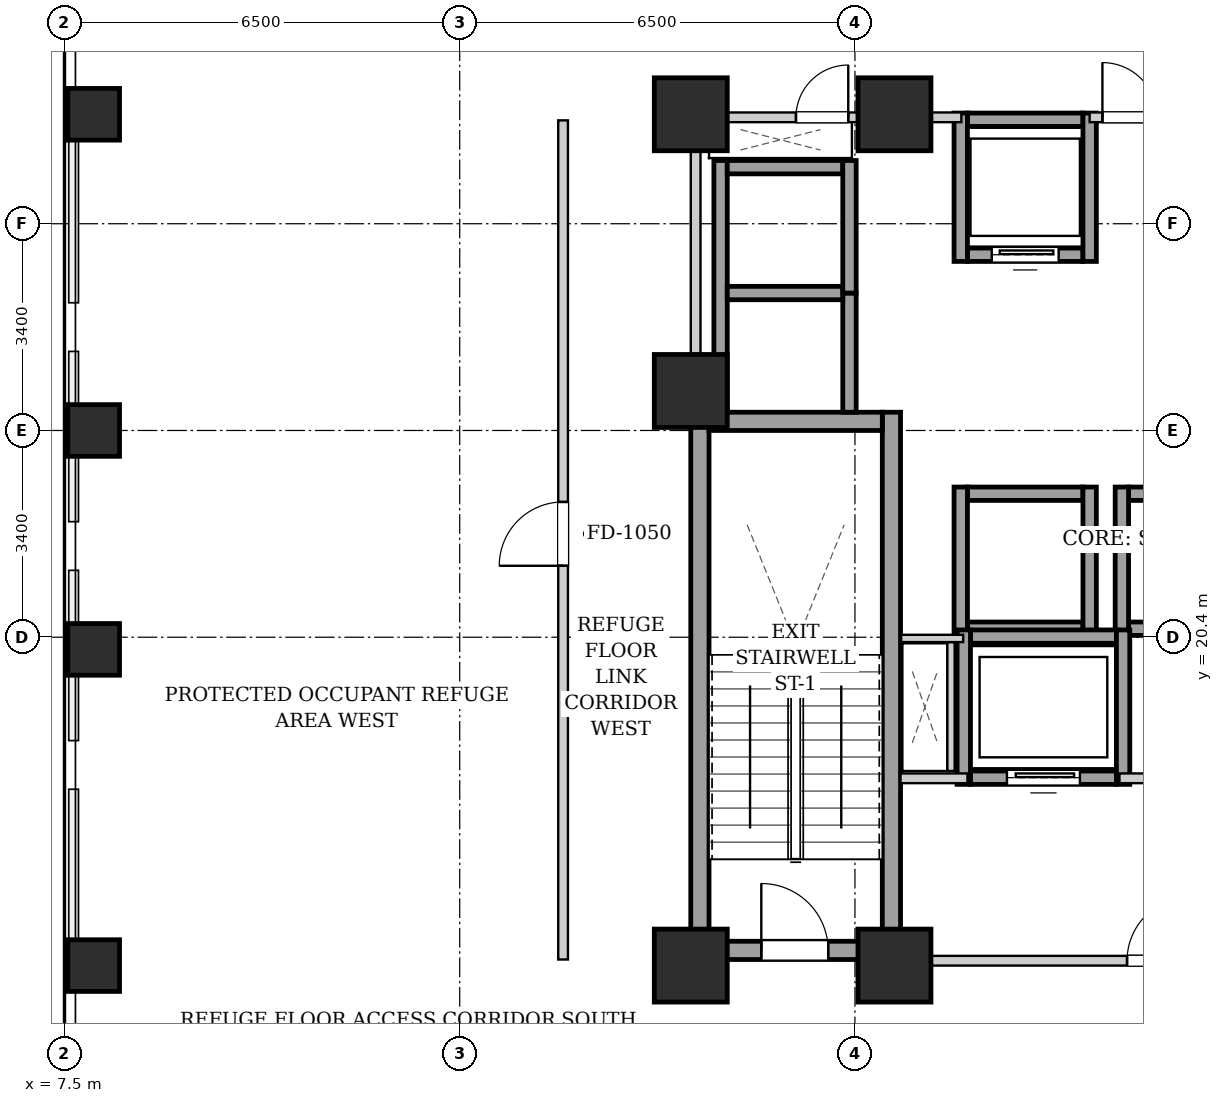
"""IFC4 building model, lengths in metres.
Left out: names, types, materials, properties, quantities, classifications, styles, units other than length and angle.
Written with IfcOpenShell. Run it as: python <this file> out.ifc"""

import sys

from ifc_helpers import new_model, si_unit, direction, frame, frame_2d, origin, origin_2d, place, context, subcontext, project, spatial, rectangle, extrude, element, fill, save


model = new_model("IFC4")
c1 = context("Model", 3, precision=1e-05, world=origin(), true_north=direction((0.0, 1.0)))
c2 = subcontext(c1, "Body", "Model", "MODEL_VIEW")
j1 = project(units=[si_unit("LENGTHUNIT", "METRE"), si_unit("PLANEANGLEUNIT", "RADIAN")], contexts=[c1])
p1 = place(None, origin())
s1 = spatial("IfcSite", under=j1, at=p1, CompositionType="ELEMENT")
p2 = place(p1, origin())
s2 = spatial("IfcBuilding", under=s1, at=p2, CompositionType="ELEMENT")
p3 = place(p2, frame((0.0, 0.0, 70.6)))
s3 = spatial("IfcBuildingStorey", under=s2, at=p3, CompositionType="ELEMENT", Elevation=70.6)
for number, where, z_axis, x_axis in (
    (1, (7.98, 15.0, 0.0), (0.0, 0.0, 1.0), (1.0, 0.0, 0.0)),
    (2, (7.98, 20.2, 0.0), (0.0, 0.0, 1.0), (1.0, 0.0, 0.0)),
    (3, (7.98, 23.8, 0.0), (0.0, 0.0, 1.0), (1.0, 0.0, 0.0)),
    (4, (7.98, 29.0, 0.0), (0.0, 0.0, 1.0), (1.0, 0.0, 0.0)),
):
    element("IfcColumn", number, at=place(p3, frame(where, z_axis=z_axis, x_axis=x_axis)), inside=s3, PredefinedType="COLUMN", context=c2, shape_type="SweptSolid", body=[
        extrude(rectangle(XDim=0.85, YDim=0.85, at=origin_2d()), origin(), (0.0, 0.0, 1.0), 4.5),
    ])
for number, where, z_axis, x_axis in (
    (5, (17.8, 15.0, 0.0), (0.0, 0.0, 1.0), (1.0, 0.0, 0.0)),
    (6, (21.15, 15.0, 0.0), (0.0, 0.0, 1.0), (1.0, 0.0, 0.0)),
    (7, (17.8, 29.0, 0.0), (0.0, 0.0, 1.0), (1.0, 0.0, 0.0)),
    (8, (21.15, 29.0, 0.0), (0.0, 0.0, 1.0), (1.0, 0.0, 0.0)),
    (9, (17.8, 24.45, 0.0), (0.0, 0.0, 1.0), (1.0, 0.0, 0.0)),
):
    element("IfcColumn", number, at=place(p3, frame(where, z_axis=z_axis, x_axis=x_axis)), inside=s3, PredefinedType="COLUMN", context=c2, shape_type="SweptSolid", body=[
        extrude(rectangle(XDim=1.2, YDim=1.2, at=origin_2d()), origin(), (0.0, 0.0, 1.0), 4.5),
    ])
for number, where, z_axis, x_axis in (
    (10, (17.95, 15.1, 0.0), (0.0, 0.0, 1.0), (0.0, 1.0, 0.0)),
    (11, (21.1, 15.1, 0.0), (0.0, 0.0, 1.0), (0.0, 1.0, 0.0)),
):
    element("IfcWall", number, at=place(p3, frame(where, z_axis=z_axis, x_axis=x_axis)), inside=s3, PredefinedType="SHEAR", context=c2, shape_type="SweptSolid", body=[
        extrude(rectangle(XDim=9.0, YDim=0.3, at=frame_2d((4.5, 0.0))), origin(), (0.0, 0.0, 1.0), 4.24),
    ])
p4 = place(p3, frame((18.1, 23.95, 0.0), z_axis=(0.0, 0.0, 1.0), x_axis=(1.0, 0.0, 0.0)))
e12 = element("IfcWall", 12, at=p4, inside=s3, PredefinedType="SHEAR", context=c2, shape_type="SweptSolid", body=[
    extrude(rectangle(XDim=2.85, YDim=0.3, at=frame_2d((1.425, 0.0))), origin(), (0.0, 0.0, 1.0), 4.24),
])
p5 = place(p3, frame((18.1, 15.25, 0.0), z_axis=(0.0, 0.0, 1.0), x_axis=(1.0, 0.0, 0.0)))
e13 = element("IfcWall", 13, at=p5, inside=s3, PredefinedType="SHEAR", context=c2, shape_type="SweptSolid", body=[
    extrude(rectangle(XDim=2.85, YDim=0.3, at=frame_2d((1.425, 0.0))), origin(), (0.0, 0.0, 1.0), 4.24),
])
p6 = place(p5, frame((0.86, 0.0, 0.0)))
e14 = element("IfcOpeningElement", 14, at=p6, cuts=e13, PredefinedType="OPENING", context=c2, shape_type="SweptSolid", body=[
    extrude(rectangle(XDim=1.1, YDim=2.05, at=frame_2d((0.55, 1.025))), frame((0.0, 0.16, 0.0), z_axis=(0.0, -1.0, 0.0), x_axis=(1.0, 0.0, 0.0)), (0.0, 0.0, 1.0), 0.32),
])
p7 = place(p3, frame((22.35, 26.69, 0.0), z_axis=(0.0, 0.0, 1.0), x_axis=(1.0, 0.0, 0.0)))
e15 = element("IfcWall", 15, at=p7, inside=s3, PredefinedType="SHEAR", context=c2, shape_type="SweptSolid", body=[
    extrude(rectangle(XDim=1.9, YDim=0.22, at=frame_2d((0.95, 0.0))), origin(), (0.0, 0.0, 1.0), 4.24),
])
p8 = place(p7, frame((0.4, 0.0, 0.0)))
e16 = element("IfcOpeningElement", 16, at=p8, cuts=e15, PredefinedType="OPENING", context=c2, shape_type="SweptSolid", body=[
    extrude(rectangle(XDim=1.1, YDim=2.15, at=frame_2d((0.55, 1.075))), frame((0.0, 0.12, 0.0), z_axis=(0.0, -1.0, 0.0), x_axis=(1.0, 0.0, 0.0)), (0.0, 0.0, 1.0), 0.24),
])
p9 = place(p3, frame((22.35, 28.91, 0.0), z_axis=(0.0, 0.0, 1.0), x_axis=(1.0, 0.0, 0.0)))
e17 = element("IfcWall", 17, at=p9, inside=s3, PredefinedType="SHEAR", context=c2, shape_type="SweptSolid", body=[
    extrude(rectangle(XDim=1.9, YDim=0.22, at=frame_2d((0.95, 0.0))), origin(), (0.0, 0.0, 1.0), 4.24),
])
for number, where, z_axis, x_axis in (
    (18, (22.24, 26.58, 0.0), (0.0, 0.0, 1.0), (0.0, 1.0, 0.0)),
    (19, (24.36, 26.58, 0.0), (0.0, 0.0, 1.0), (0.0, 1.0, 0.0)),
):
    element("IfcWall", number, at=place(p3, frame(where, z_axis=z_axis, x_axis=x_axis)), inside=s3, PredefinedType="SHEAR", context=c2, shape_type="SweptSolid", body=[
        extrude(rectangle(XDim=2.44, YDim=0.22, at=frame_2d((1.22, 0.0))), origin(), (0.0, 0.0, 1.0), 4.24),
    ])
for number, where, z_axis, x_axis in (
    (20, (22.35, 20.54, 0.0), (0.0, 0.0, 1.0), (1.0, 0.0, 0.0)),
    (21, (22.35, 22.76, 0.0), (0.0, 0.0, 1.0), (1.0, 0.0, 0.0)),
):
    element("IfcWall", number, at=place(p3, frame(where, z_axis=z_axis, x_axis=x_axis)), inside=s3, PredefinedType="SHEAR", context=c2, shape_type="SweptSolid", body=[
        extrude(rectangle(XDim=1.9, YDim=0.22, at=frame_2d((0.95, 0.0))), origin(), (0.0, 0.0, 1.0), 4.24),
    ])
for number, where, z_axis, x_axis in (
    (22, (22.24, 20.43, 0.0), (0.0, 0.0, 1.0), (0.0, 1.0, 0.0)),
    (23, (24.36, 20.43, 0.0), (0.0, 0.0, 1.0), (0.0, 1.0, 0.0)),
):
    element("IfcWall", number, at=place(p3, frame(where, z_axis=z_axis, x_axis=x_axis)), inside=s3, PredefinedType="SHEAR", context=c2, shape_type="SweptSolid", body=[
        extrude(rectangle(XDim=2.44, YDim=0.22, at=frame_2d((1.22, 0.0))), origin(), (0.0, 0.0, 1.0), 4.24),
    ])
for number, where, z_axis, x_axis in (
    (24, (25.0, 20.54, 0.0), (0.0, 0.0, 1.0), (1.0, 0.0, 0.0)),
    (25, (25.0, 22.76, 0.0), (0.0, 0.0, 1.0), (1.0, 0.0, 0.0)),
):
    element("IfcWall", number, at=place(p3, frame(where, z_axis=z_axis, x_axis=x_axis)), inside=s3, PredefinedType="SHEAR", context=c2, shape_type="SweptSolid", body=[
        extrude(rectangle(XDim=1.9, YDim=0.22, at=frame_2d((0.95, 0.0))), origin(), (0.0, 0.0, 1.0), 4.24),
    ])
p10 = place(p3, frame((24.89, 20.43, 0.0), z_axis=(0.0, 0.0, 1.0), x_axis=(0.0, 1.0, 0.0)))
e26 = element("IfcWall", 26, at=p10, inside=s3, PredefinedType="SHEAR", context=c2, shape_type="SweptSolid", body=[
    extrude(rectangle(XDim=2.44, YDim=0.22, at=frame_2d((1.22, 0.0))), origin(), (0.0, 0.0, 1.0), 4.24),
])
p11 = place(p3, frame((18.29, 24.1, 0.0), z_axis=(0.0, 0.0, 1.0), x_axis=(0.0, 1.0, 0.0)))
e27 = element("IfcWall", 27, at=p11, inside=s3, PredefinedType="SHEAR", context=c2, shape_type="SweptSolid", body=[
    extrude(rectangle(XDim=4.14, YDim=0.22, at=frame_2d((2.07, 0.0))), origin(), (0.0, 0.0, 1.0), 4.24),
])
p12 = place(p3, frame((20.41, 24.1, 0.0), z_axis=(0.0, 0.0, 1.0), x_axis=(0.0, 1.0, 0.0)))
e28 = element("IfcWall", 28, at=p12, inside=s3, PredefinedType="SHEAR", context=c2, shape_type="SweptSolid", body=[
    extrude(rectangle(XDim=1.96, YDim=0.22, at=frame_2d((0.98, 0.0))), origin(), (0.0, 0.0, 1.0), 4.24),
])
for number, where, z_axis, x_axis in (
    (29, (18.4, 26.06, 0.0), (0.0, 0.0, 1.0), (1.0, 0.0, 0.0)),
    (30, (18.4, 28.13, 0.0), (0.0, 0.0, 1.0), (1.0, 0.0, 0.0)),
):
    element("IfcWall", number, at=place(p3, frame(where, z_axis=z_axis, x_axis=x_axis)), inside=s3, PredefinedType="SHEAR", context=c2, shape_type="SweptSolid", body=[
        extrude(rectangle(XDim=1.9, YDim=0.22, at=frame_2d((0.95, 0.0))), origin(), (0.0, 0.0, 1.0), 4.24),
    ])
p13 = place(p3, frame((20.41, 26.06, 0.0), z_axis=(0.0, 0.0, 1.0), x_axis=(0.0, 1.0, 0.0)))
e31 = element("IfcWall", 31, at=p13, inside=s3, PredefinedType="SHEAR", context=c2, shape_type="SweptSolid", body=[
    extrude(rectangle(XDim=2.18, YDim=0.22, at=frame_2d((1.09, 0.0))), origin(), (0.0, 0.0, 1.0), 4.24),
])
p14 = place(p3, frame((22.4, 18.09, 0.0), z_axis=(0.0, 0.0, 1.0), x_axis=(1.0, 0.0, 0.0)))
e32 = element("IfcWall", 32, at=p14, inside=s3, PredefinedType="SHEAR", context=c2, shape_type="SweptSolid", body=[
    extrude(rectangle(XDim=2.4, YDim=0.22, at=frame_2d((1.2, 0.0))), origin(), (0.0, 0.0, 1.0), 4.24),
])
p15 = place(p14, frame((0.6, 0.0, 0.0)))
e33 = element("IfcOpeningElement", 33, at=p15, cuts=e32, PredefinedType="OPENING", context=c2, shape_type="SweptSolid", body=[
    extrude(rectangle(XDim=1.2, YDim=2.15, at=frame_2d((0.6, 1.075))), frame((0.0, 0.12, 0.0), z_axis=(0.0, -1.0, 0.0), x_axis=(1.0, 0.0, 0.0)), (0.0, 0.0, 1.0), 0.24),
])
p16 = place(p3, frame((22.4, 20.41, 0.0), z_axis=(0.0, 0.0, 1.0), x_axis=(1.0, 0.0, 0.0)))
e34 = element("IfcWall", 34, at=p16, inside=s3, PredefinedType="SHEAR", context=c2, shape_type="SweptSolid", body=[
    extrude(rectangle(XDim=2.4, YDim=0.22, at=frame_2d((1.2, 0.0))), origin(), (0.0, 0.0, 1.0), 4.24),
])
for number, where, z_axis, x_axis in (
    (35, (22.29, 17.98, 0.0), (0.0, 0.0, 1.0), (0.0, 1.0, 0.0)),
    (36, (24.91, 17.98, 0.0), (0.0, 0.0, 1.0), (0.0, 1.0, 0.0)),
):
    element("IfcWall", number, at=place(p3, frame(where, z_axis=z_axis, x_axis=x_axis)), inside=s3, PredefinedType="SHEAR", context=c2, shape_type="SweptSolid", body=[
        extrude(rectangle(XDim=2.54, YDim=0.22, at=frame_2d((1.27, 0.0))), origin(), (0.0, 0.0, 1.0), 4.24),
    ])
p17 = place(p3, frame((21.25, 15.08, 0.0), z_axis=(0.0, 0.0, 1.0), x_axis=(1.0, 0.0, 0.0)))
e37 = element("IfcWall", 37, at=p17, inside=s3, PredefinedType="PARTITIONING", context=c2, shape_type="SweptSolid", body=[
    extrude(rectangle(XDim=8.5, YDim=0.16, at=frame_2d((4.25, 0.0))), origin(), (0.0, 0.0, 1.0), 4.24),
])
p18 = place(p17, frame((3.725, 0.0, 0.0)))
e38 = element("IfcOpeningElement", 38, at=p18, cuts=e37, PredefinedType="OPENING", context=c2, shape_type="SweptSolid", body=[
    extrude(rectangle(XDim=1.05, YDim=2.05, at=frame_2d((0.525, 1.025))), frame((0.0, 0.09, 0.0), z_axis=(0.0, -1.0, 0.0), x_axis=(1.0, 0.0, 0.0)), (0.0, 0.0, 1.0), 0.18),
])
p19 = place(p3, frame((21.25, 18.08, 0.0), z_axis=(0.0, 0.0, 1.0), x_axis=(1.0, 0.0, 0.0)))
e39 = element("IfcWall", 39, at=p19, inside=s3, PredefinedType="PARTITIONING", context=c2, shape_type="SweptSolid", body=[
    extrude(rectangle(XDim=1.1, YDim=0.16, at=frame_2d((0.55, 0.0))), origin(), (0.0, 0.0, 1.0), 4.24),
])
p20 = place(p3, frame((24.85, 18.08, 0.0), z_axis=(0.0, 0.0, 1.0), x_axis=(1.0, 0.0, 0.0)))
e40 = element("IfcWall", 40, at=p20, inside=s3, PredefinedType="PARTITIONING", context=c2, shape_type="SweptSolid", body=[
    extrude(rectangle(XDim=1.3, YDim=0.16, at=frame_2d((0.65, 0.0))), origin(), (0.0, 0.0, 1.0), 4.24),
])
p21 = place(p3, frame((17.88, 24.12, 0.0), z_axis=(0.0, 0.0, 1.0), x_axis=(0.0, 1.0, 0.0)))
e41 = element("IfcWall", 41, at=p21, inside=s3, PredefinedType="PARTITIONING", context=c2, shape_type="SweptSolid", body=[
    extrude(rectangle(XDim=4.76, YDim=0.16, at=frame_2d((2.38, 0.0))), origin(), (0.0, 0.0, 1.0), 4.24),
])
p22 = place(p3, frame((24.36, 28.95, 0.0), z_axis=(0.0, 0.0, 1.0), x_axis=(1.0, 0.0, 0.0)))
e42 = element("IfcWall", 42, at=p22, inside=s3, PredefinedType="PARTITIONING", context=c2, shape_type="SweptSolid", body=[
    extrude(rectangle(XDim=1.32, YDim=0.16, at=frame_2d((0.66, 0.0))), origin(), (0.0, 0.0, 1.0), 4.24),
])
p23 = place(p22, frame((0.21, 0.0, 0.0)))
e43 = element("IfcOpeningElement", 43, at=p23, cuts=e42, PredefinedType="OPENING", context=c2, shape_type="SweptSolid", body=[
    extrude(rectangle(XDim=0.9, YDim=2.05, at=frame_2d((0.45, 1.025))), frame((0.0, 0.09, 0.0), z_axis=(0.0, -1.0, 0.0), x_axis=(1.0, 0.0, 0.0)), (0.0, 0.0, 1.0), 0.18),
])
p24 = place(p3, frame((17.96, 28.95, 0.0), z_axis=(0.0, 0.0, 1.0), x_axis=(1.0, 0.0, 0.0)))
e44 = element("IfcWall", 44, at=p24, inside=s3, PredefinedType="PARTITIONING", context=c2, shape_type="SweptSolid", body=[
    extrude(rectangle(XDim=4.29, YDim=0.16, at=frame_2d((2.145, 0.0))), origin(), (0.0, 0.0, 1.0), 4.24),
])
p25 = place(p24, frame((1.57, 0.0, 0.0)))
e45 = element("IfcOpeningElement", 45, at=p25, cuts=e44, PredefinedType="OPENING", context=c2, shape_type="SweptSolid", body=[
    extrude(rectangle(XDim=0.86, YDim=2.05, at=frame_2d((0.43, 1.025))), frame((0.0, 0.09, 0.0), z_axis=(0.0, -1.0, 0.0), x_axis=(1.0, 0.0, 0.0)), (0.0, 0.0, 1.0), 0.18),
])
p26 = place(p3, frame((22.08, 18.2, 0.0), z_axis=(0.0, 0.0, 1.0), x_axis=(0.0, 1.0, 0.0)))
e46 = element("IfcWall", 46, at=p26, inside=s3, PredefinedType="PARTITIONING", context=c2, shape_type="SweptSolid", body=[
    extrude(rectangle(XDim=2.12, YDim=0.12, at=frame_2d((1.06, 0.0))), origin(), (0.0, 0.0, 1.0), 4.24),
])
p27 = place(p3, frame((22.28, 20.38, 0.0), z_axis=(0.0, 0.0, 1.0), x_axis=(-1.0, 0.0, 0.0)))
e47 = element("IfcWall", 47, at=p27, inside=s3, PredefinedType="PARTITIONING", context=c2, shape_type="SweptSolid", body=[
    extrude(rectangle(XDim=1.02, YDim=0.12, at=frame_2d((0.51, 0.0))), origin(), (0.0, 0.0, 1.0), 4.24),
])
p28 = place(p3, frame((15.7, 15.1, 0.0), z_axis=(0.0, 0.0, 1.0), x_axis=(0.0, 1.0, 0.0)))
e48 = element("IfcWall", 48, at=p28, inside=s3, PredefinedType="PARTITIONING", context=c2, shape_type="SweptSolid", body=[
    extrude(rectangle(XDim=13.8, YDim=0.16, at=frame_2d((6.9, 0.0))), origin(), (0.0, 0.0, 1.0), 4.24),
])
p29 = place(p28, frame((6.475, 0.0, 0.0)))
e49 = element("IfcOpeningElement", 49, at=p29, cuts=e48, PredefinedType="OPENING", context=c2, shape_type="SweptSolid", body=[
    extrude(rectangle(XDim=1.05, YDim=2.05, at=frame_2d((0.525, 1.025))), frame((0.0, 0.09, 0.0), z_axis=(0.0, -1.0, 0.0), x_axis=(1.0, 0.0, 0.0)), (0.0, 0.0, 1.0), 0.18),
])
p30 = place(p6, origin())
e50 = element("IfcDoor", 50, at=p30, inside=s3, OperationType="SINGLE_SWING_LEFT", PredefinedType="DOOR", context=c2, shape_type="SweptSolid", body=[
    extrude(rectangle(XDim=1.1, YDim=2.05, at=frame_2d((0.55, 1.025))), frame((0.0, 0.025, 0.0), z_axis=(0.0, -1.0, 0.0), x_axis=(1.0, 0.0, 0.0)), (0.0, 0.0, 1.0), 0.05),
])
fill(e14, e50)
p31 = place(p8, origin())
e51 = element("IfcDoor", 51, at=p31, inside=s3, OperationType="SLIDING_TO_LEFT", PredefinedType="DOOR", context=c2, shape_type="SweptSolid", body=[
    extrude(rectangle(XDim=1.1, YDim=2.15, at=frame_2d((0.55, 1.075))), frame((0.0, 0.025, 0.0), z_axis=(0.0, -1.0, 0.0), x_axis=(1.0, 0.0, 0.0)), (0.0, 0.0, 1.0), 0.05),
])
fill(e16, e51)
p32 = place(p15, origin())
e52 = element("IfcDoor", 52, at=p32, inside=s3, OperationType="SLIDING_TO_LEFT", PredefinedType="DOOR", context=c2, shape_type="SweptSolid", body=[
    extrude(rectangle(XDim=1.2, YDim=2.15, at=frame_2d((0.6, 1.075))), frame((0.0, 0.025, 0.0), z_axis=(0.0, -1.0, 0.0), x_axis=(1.0, 0.0, 0.0)), (0.0, 0.0, 1.0), 0.05),
])
fill(e33, e52)
p33 = place(p18, origin())
e53 = element("IfcDoor", 53, at=p33, inside=s3, OperationType="SINGLE_SWING_RIGHT", PredefinedType="DOOR", context=c2, shape_type="SweptSolid", body=[
    extrude(rectangle(XDim=1.05, YDim=2.05, at=frame_2d((0.525, 1.025))), frame((0.0, 0.025, 0.0), z_axis=(0.0, -1.0, 0.0), x_axis=(1.0, 0.0, 0.0)), (0.0, 0.0, 1.0), 0.05),
])
fill(e38, e53)
p34 = place(p23, origin())
e54 = element("IfcDoor", 54, at=p34, inside=s3, OperationType="SINGLE_SWING_LEFT", PredefinedType="DOOR", context=c2, shape_type="SweptSolid", body=[
    extrude(rectangle(XDim=0.9, YDim=2.05, at=frame_2d((0.45, 1.025))), frame((0.0, 0.025, 0.0), z_axis=(0.0, -1.0, 0.0), x_axis=(1.0, 0.0, 0.0)), (0.0, 0.0, 1.0), 0.05),
])
fill(e43, e54)
p35 = place(p25, origin())
e55 = element("IfcDoor", 55, at=p35, inside=s3, OperationType="SINGLE_SWING_RIGHT", PredefinedType="DOOR", context=c2, shape_type="SweptSolid", body=[
    extrude(rectangle(XDim=0.86, YDim=2.05, at=frame_2d((0.43, 1.025))), frame((0.0, 0.025, 0.0), z_axis=(0.0, -1.0, 0.0), x_axis=(1.0, 0.0, 0.0)), (0.0, 0.0, 1.0), 0.05),
])
fill(e45, e55)
p36 = place(p29, origin())
e56 = element("IfcDoor", 56, at=p36, inside=s3, OperationType="SINGLE_SWING_LEFT", PredefinedType="DOOR", context=c2, shape_type="SweptSolid", body=[
    extrude(rectangle(XDim=1.05, YDim=2.05, at=frame_2d((0.525, 1.025))), frame((0.0, 0.025, 0.0), z_axis=(0.0, -1.0, 0.0), x_axis=(1.0, 0.0, 0.0)), (0.0, 0.0, 1.0), 0.05),
])
fill(e49, e56)
save(model, sys.argv[1])
